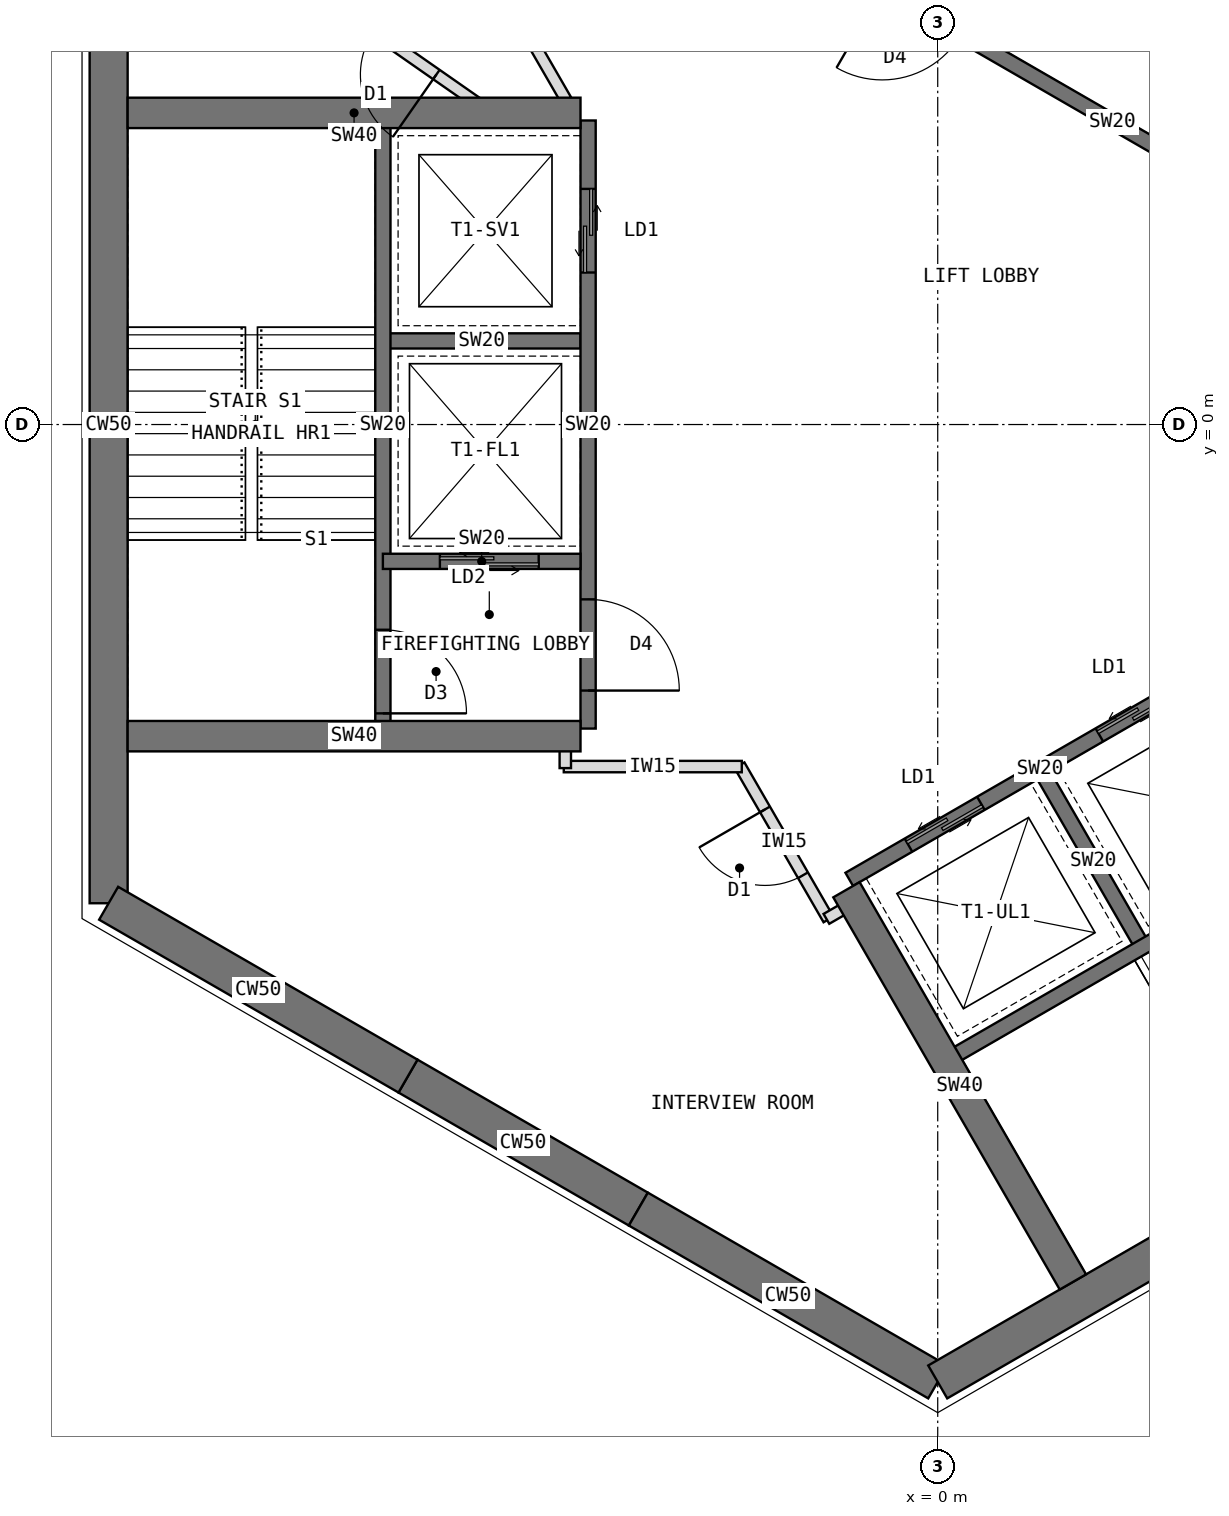
"""IFC4 building model, lengths in metres.
Left out: names, types, materials, properties, quantities, classifications, styles, units other than length and angle.
Written with IfcOpenShell. Run it as: python <this file> out.ifc"""

import sys

from ifc_helpers import new_model, si_unit, direction, frame, frame_2d, origin, place, context, subcontext, project, spatial, rectangle, extrude, element, fill, save


model = new_model("IFC4")
c1 = context("Model", 3, precision=1e-05, world=origin(), true_north=direction((0.0, 1.0)))
c2 = subcontext(c1, "Body", "Model", "MODEL_VIEW")
j1 = project(units=[si_unit("LENGTHUNIT", "METRE"), si_unit("PLANEANGLEUNIT", "RADIAN")], contexts=[c1])
p1 = place(None, origin())
s1 = spatial("IfcSite", under=j1, at=p1, CompositionType="ELEMENT")
p2 = place(p1, origin())
s2 = spatial("IfcBuilding", under=s1, at=p2, CompositionType="ELEMENT")
p3 = place(p2, frame((0.0, 0.0, 206.5)))
s3 = spatial("IfcBuildingStorey", under=s2, at=p3, CompositionType="ELEMENT", Elevation=206.5)
p4 = place(p3, frame((-10.908, 6.298, 0.0), z_axis=(0.0, 0.0, 1.0), x_axis=(0.0, -1.0, 0.0)))
e1 = element("IfcWall", 1, at=p4, inside=s3, PredefinedType="SHEAR", context=c2, shape_type="SweptSolid", body=[
    extrude(rectangle(XDim=12.596, YDim=0.5, at=frame_2d((6.298, 0.0))), origin(), (0.0, 0.0, 1.0), 4.0),
])
p5 = place(p3, frame((-10.908, -6.298, 0.0), z_axis=(0.0, 0.0, 1.0), x_axis=(0.866034513004, -0.499984222037, 0.0)))
e2 = element("IfcWall", 2, at=p5, inside=s3, PredefinedType="SHEAR", context=c2, shape_type="SweptSolid", body=[
    extrude(rectangle(XDim=4.548, YDim=0.5, at=frame_2d((2.274, 0.0))), origin(), (0.0, 0.0, 1.0), 4.0),
])
p6 = place(p3, frame((-6.97, -8.572, 0.0), z_axis=(0.0, 0.0, 1.0), x_axis=(0.866019471182, -0.500010275428, 0.0)))
e3 = element("IfcWall", 3, at=p6, inside=s3, PredefinedType="SHEAR", context=c2, shape_type="SweptSolid", body=[
    extrude(rectangle(XDim=3.5, YDim=0.5, at=frame_2d((1.75, 0.0))), origin(), (0.0, 0.0, 1.0), 4.0),
])
p7 = place(p3, frame((-3.939, -10.322, 0.0), z_axis=(0.0, 0.0, 1.0), x_axis=(0.866011268655, -0.500024481964, 0.0)))
e4 = element("IfcWall", 4, at=p7, inside=s3, PredefinedType="SHEAR", context=c2, shape_type="SweptSolid", body=[
    extrude(rectangle(XDim=4.548, YDim=0.5, at=frame_2d((2.274, 0.0))), origin(), (0.0, 0.0, 1.0), 4.0),
])
p8 = place(p3, frame((0.0, -12.596, 0.0), z_axis=(0.0, 0.0, 1.0), x_axis=(0.866021940709, 0.500005998175, 0.0)))
e5 = element("IfcWall", 5, at=p8, inside=s3, PredefinedType="SHEAR", context=c2, shape_type="SweptSolid", body=[
    extrude(rectangle(XDim=12.596, YDim=0.5, at=frame_2d((6.298, 0.0))), origin(), (0.0, 0.0, 1.0), 4.0),
])
p9 = place(p3, frame((5.764, 1.984, 0.0), z_axis=(0.0, 0.0, 1.0), x_axis=(-0.866026010844, 0.49999894854, 0.0)))
e6 = element("IfcWall", 6, at=p9, inside=s3, PredefinedType="SHEAR", context=c2, shape_type="SweptSolid", body=[
    extrude(rectangle(XDim=8.0, YDim=0.2, at=frame_2d((4.0, 0.0))), origin(), (0.0, 0.0, 1.0), 4.0),
])
p10 = place(p9, frame((6.3, 0.0, 0.0)))
e7 = element("IfcOpeningElement", 7, at=p10, cuts=e6, PredefinedType="OPENING", context=c2, shape_type="SweptSolid", body=[
    extrude(rectangle(XDim=1.2, YDim=2.1, at=frame_2d((0.6, 1.05))), frame((0.0, 0.11, 0.0), z_axis=(0.0, -1.0, 0.0), x_axis=(1.0, 0.0, 0.0)), (0.0, 0.0, 1.0), 0.22),
])
p11 = place(p3, frame((7.114, 4.322, 0.0), z_axis=(0.0, 0.0, 1.0), x_axis=(-0.866026010844, 0.49999894854, 0.0)))
e8 = element("IfcWall", 8, at=p11, inside=s3, PredefinedType="SHEAR", context=c2, shape_type="SweptSolid", body=[
    extrude(rectangle(XDim=8.0, YDim=0.2, at=frame_2d((4.0, 0.0))), origin(), (0.0, 0.0, 1.0), 4.0),
])
p12 = place(p11, frame((6.8, 0.0, 0.0)))
e9 = element("IfcOpeningElement", 9, at=p12, cuts=e8, PredefinedType="OPENING", context=c2, shape_type="SweptSolid", body=[
    extrude(rectangle(XDim=0.9, YDim=2.1, at=frame_2d((0.45, 1.05))), frame((0.0, 0.11, 0.0), z_axis=(0.0, -1.0, 0.0), x_axis=(1.0, 0.0, 0.0)), (0.0, 0.0, 1.0), 0.22),
])
p13 = place(p3, frame((-4.6, 4.0, 0.0), z_axis=(0.0, 0.0, 1.0), x_axis=(0.0, -1.0, 0.0)))
e10 = element("IfcWall", 10, at=p13, inside=s3, PredefinedType="SHEAR", context=c2, shape_type="SweptSolid", body=[
    extrude(rectangle(XDim=8.0, YDim=0.2, at=frame_2d((4.0, 0.0))), origin(), (0.0, 0.0, 1.0), 4.0),
])
p14 = place(p13, frame((6.3, 0.0, 0.0)))
e11 = element("IfcOpeningElement", 11, at=p14, cuts=e10, PredefinedType="OPENING", context=c2, shape_type="SweptSolid", body=[
    extrude(rectangle(XDim=1.2, YDim=2.1, at=frame_2d((0.6, 1.05))), frame((0.0, 0.11, 0.0), z_axis=(0.0, -1.0, 0.0), x_axis=(1.0, 0.0, 0.0)), (0.0, 0.0, 1.0), 0.22),
])
p15 = place(p13, frame((0.9, 0.0, 0.0)))
e12 = element("IfcOpeningElement", 12, at=p15, cuts=e10, PredefinedType="OPENING", context=c2, shape_type="SweptSolid", body=[
    extrude(rectangle(XDim=1.1, YDim=2.2, at=frame_2d((0.55, 1.1))), frame((0.0, 0.11, 0.0), z_axis=(0.0, -1.0, 0.0), x_axis=(1.0, 0.0, 0.0)), (0.0, 0.0, 1.0), 0.22),
])
p16 = place(p3, frame((-4.7, 1.1, 0.0), z_axis=(0.0, 0.0, 1.0), x_axis=(-1.0, 0.0, 0.0)))
e13 = element("IfcWall", 13, at=p16, inside=s3, PredefinedType="SHEAR", context=c2, shape_type="SweptSolid", body=[
    extrude(rectangle(XDim=2.6, YDim=0.2, at=frame_2d((1.3, 0.0))), origin(), (0.0, 0.0, 1.0), 4.0),
])
p17 = place(p3, frame((-4.7, -1.8, 0.0), z_axis=(0.0, 0.0, 1.0), x_axis=(-1.0, 0.0, 0.0)))
e14 = element("IfcWall", 14, at=p17, inside=s3, PredefinedType="SHEAR", context=c2, shape_type="SweptSolid", body=[
    extrude(rectangle(XDim=2.6, YDim=0.2, at=frame_2d((1.3, 0.0))), origin(), (0.0, 0.0, 1.0), 4.0),
])
p18 = place(p17, frame((0.55, 0.0, 0.0)))
e15 = element("IfcOpeningElement", 15, at=p18, cuts=e14, PredefinedType="OPENING", context=c2, shape_type="SweptSolid", body=[
    extrude(rectangle(XDim=1.3, YDim=2.2, at=frame_2d((0.65, 1.1))), frame((0.0, 0.11, 0.0), z_axis=(0.0, -1.0, 0.0), x_axis=(1.0, 0.0, 0.0)), (0.0, 0.0, 1.0), 0.22),
])
p19 = place(p3, frame((-7.3, 4.0, 0.0), z_axis=(0.0, 0.0, 1.0), x_axis=(0.0, -1.0, 0.0)))
e16 = element("IfcWall", 16, at=p19, inside=s3, PredefinedType="SHEAR", context=c2, shape_type="SweptSolid", body=[
    extrude(rectangle(XDim=8.0, YDim=0.2, at=frame_2d((4.0, 0.0))), origin(), (0.0, 0.0, 1.0), 4.0),
])
p20 = place(p19, frame((6.7, 0.0, 0.0)))
e17 = element("IfcOpeningElement", 17, at=p20, cuts=e16, PredefinedType="OPENING", context=c2, shape_type="SweptSolid", body=[
    extrude(rectangle(XDim=1.1, YDim=2.1, at=frame_2d((0.55, 1.05))), frame((0.0, 0.11, 0.0), z_axis=(0.0, -1.0, 0.0), x_axis=(1.0, 0.0, 0.0)), (0.0, 0.0, 1.0), 0.22),
])
for number, where, z_axis, x_axis in (
    (18, (-4.7, -4.1, 0.0), (0.0, 0.0, 1.0), (-1.0, 0.0, 0.0)),
    (19, (-4.7, 4.1, 0.0), (0.0, 0.0, 1.0), (-1.0, 0.0, 0.0)),
):
    element("IfcWall", number, at=place(p3, frame(where, z_axis=z_axis, x_axis=x_axis)), inside=s3, PredefinedType="SHEAR", context=c2, shape_type="SweptSolid", body=[
        extrude(rectangle(XDim=5.958, YDim=0.4, at=frame_2d((2.979, 0.0))), origin(), (0.0, 0.0, 1.0), 4.0),
    ])
p21 = place(p3, frame((-1.164, -5.984, 0.0), z_axis=(0.0, 0.0, 1.0), x_axis=(0.866026010844, 0.49999894854, 0.0)))
e20 = element("IfcWall", 20, at=p21, inside=s3, PredefinedType="SHEAR", context=c2, shape_type="SweptSolid", body=[
    extrude(rectangle(XDim=8.0, YDim=0.2, at=frame_2d((4.0, 0.0))), origin(), (0.0, 0.0, 1.0), 4.0),
])
p22 = place(p21, frame((6.3, 0.0, 0.0)))
e21 = element("IfcOpeningElement", 21, at=p22, cuts=e20, PredefinedType="OPENING", context=c2, shape_type="SweptSolid", body=[
    extrude(rectangle(XDim=1.2, YDim=2.1, at=frame_2d((0.6, 1.05))), frame((0.0, 0.11, 0.0), z_axis=(0.0, -1.0, 0.0), x_axis=(1.0, 0.0, 0.0)), (0.0, 0.0, 1.0), 0.22),
])
p23 = place(p21, frame((0.9, 0.0, 0.0)))
e22 = element("IfcOpeningElement", 22, at=p23, cuts=e20, PredefinedType="OPENING", context=c2, shape_type="SweptSolid", body=[
    extrude(rectangle(XDim=1.1, YDim=2.2, at=frame_2d((0.55, 1.1))), frame((0.0, 0.11, 0.0), z_axis=(0.0, -1.0, 0.0), x_axis=(1.0, 0.0, 0.0)), (0.0, 0.0, 1.0), 0.22),
])
p24 = place(p21, frame((3.8, 0.0, 0.0)))
e23 = element("IfcOpeningElement", 23, at=p24, cuts=e20, PredefinedType="OPENING", context=c2, shape_type="SweptSolid", body=[
    extrude(rectangle(XDim=1.1, YDim=2.2, at=frame_2d((0.55, 1.1))), frame((0.0, 0.11, 0.0), z_axis=(0.0, -1.0, 0.0), x_axis=(1.0, 0.0, 0.0)), (0.0, 0.0, 1.0), 0.22),
])
p25 = place(p3, frame((1.397, -4.62, 0.0), z_axis=(0.0, 0.0, 1.0), x_axis=(0.499936506574, -0.866062058628, 0.0)))
e24 = element("IfcWall", 24, at=p25, inside=s3, PredefinedType="SHEAR", context=c2, shape_type="SweptSolid", body=[
    extrude(rectangle(XDim=2.6, YDim=0.2, at=frame_2d((1.3, 0.0))), origin(), (0.0, 0.0, 1.0), 4.0),
])
p26 = place(p3, frame((0.186, -8.322, 0.0), z_axis=(0.0, 0.0, 1.0), x_axis=(0.866026010844, 0.49999894854, 0.0)))
e25 = element("IfcWall", 25, at=p26, inside=s3, PredefinedType="SHEAR", context=c2, shape_type="SweptSolid", body=[
    extrude(rectangle(XDim=8.0, YDim=0.2, at=frame_2d((4.0, 0.0))), origin(), (0.0, 0.0, 1.0), 4.0),
])
p27 = place(p26, frame((6.7, 0.0, 0.0)))
e26 = element("IfcOpeningElement", 26, at=p27, cuts=e25, PredefinedType="OPENING", context=c2, shape_type="SweptSolid", body=[
    extrude(rectangle(XDim=1.1, YDim=2.1, at=frame_2d((0.55, 1.05))), frame((0.0, 0.11, 0.0), z_axis=(0.0, -1.0, 0.0), x_axis=(1.0, 0.0, 0.0)), (0.0, 0.0, 1.0), 0.22),
])
p28 = place(p3, frame((-1.201, -6.12, 0.0), z_axis=(0.0, 0.0, 1.0), x_axis=(0.500021575205, -0.866012946976, 0.0)))
e27 = element("IfcWall", 27, at=p28, inside=s3, PredefinedType="SHEAR", context=c2, shape_type="SweptSolid", body=[
    extrude(rectangle(XDim=5.958, YDim=0.4, at=frame_2d((2.979, 0.0))), origin(), (0.0, 0.0, 1.0), 4.0),
])
p29 = place(p3, frame((-1.437, -6.511, 0.0), z_axis=(0.0, 0.0, 1.0), x_axis=(-0.500074377092, 0.865982457891, 0.0)))
e28 = element("IfcWall", 28, at=p29, inside=s3, PredefinedType="PARTITIONING", context=c2, shape_type="SweptSolid", body=[
    extrude(rectangle(XDim=2.342, YDim=0.15, at=frame_2d((1.171, 0.0))), origin(), (0.0, 0.0, 1.0), 3.8),
])
p30 = place(p29, frame((0.671, 0.0, 0.0)))
e29 = element("IfcOpeningElement", 29, at=p30, cuts=e28, PredefinedType="OPENING", context=c2, shape_type="SweptSolid", body=[
    extrude(rectangle(XDim=1.0, YDim=2.1, at=frame_2d((0.5, 1.05))), frame((0.0, 0.085, 0.0), z_axis=(0.0, -1.0, 0.0), x_axis=(1.0, 0.0, 0.0)), (0.0, 0.0, 1.0), 0.17),
])
p31 = place(p3, frame((-2.578, -4.5, 0.0), z_axis=(0.0, 0.0, 1.0), x_axis=(-1.0, 0.0, 0.0)))
e30 = element("IfcWall", 30, at=p31, inside=s3, PredefinedType="PARTITIONING", context=c2, shape_type="SweptSolid", body=[
    extrude(rectangle(XDim=2.342, YDim=0.15, at=frame_2d((1.171, 0.0))), origin(), (0.0, 0.0, 1.0), 3.8),
])
p32 = place(p3, frame((-4.9, -4.52, 0.0), z_axis=(0.0, 0.0, 1.0), x_axis=(0.0, 1.0, 0.0)))
e31 = element("IfcWall", 31, at=p32, inside=s3, PredefinedType="PARTITIONING", context=c2, shape_type="SweptSolid", body=[
    extrude(rectangle(XDim=0.43, YDim=0.15, at=frame_2d((0.215, 0.0))), origin(), (0.0, 0.0, 1.0), 3.8),
])
p33 = place(p3, frame((-4.89, 4.27, 0.0), z_axis=(0.0, 0.0, 1.0), x_axis=(-0.500032211057, 0.866006805923, 0.0)))
e32 = element("IfcWall", 32, at=p33, inside=s3, PredefinedType="PARTITIONING", context=c2, shape_type="SweptSolid", body=[
    extrude(rectangle(XDim=4.526, YDim=0.15, at=frame_2d((2.263, 0.0))), origin(), (0.0, 0.0, 1.0), 3.8),
])
p34 = place(p33, frame((2.668, 0.0, 0.0)))
e33 = element("IfcOpeningElement", 33, at=p34, cuts=e32, PredefinedType="OPENING", context=c2, shape_type="SweptSolid", body=[
    extrude(rectangle(XDim=1.0, YDim=2.1, at=frame_2d((0.5, 1.05))), frame((0.0, 0.085, 0.0), z_axis=(0.0, -1.0, 0.0), x_axis=(1.0, 0.0, 0.0)), (0.0, 0.0, 1.0), 0.17),
])
p35 = place(p3, frame((-1.092, -6.289, 0.0), z_axis=(0.0, 0.0, 1.0), x_axis=(-0.866138304741, -0.499804398801, 0.0)))
e34 = element("IfcWall", 34, at=p35, inside=s3, PredefinedType="PARTITIONING", context=c2, shape_type="SweptSolid", body=[
    extrude(rectangle(XDim=0.43, YDim=0.15, at=frame_2d((0.215, 0.0))), origin(), (0.0, 0.0, 1.0), 3.8),
])
p36 = place(p3, frame((-5.873, 4.1, 0.0), z_axis=(0.0, 0.0, 1.0), x_axis=(-0.819975923972, 0.572398011969, 0.0)))
e35 = element("IfcWall", 35, at=p36, inside=s3, PredefinedType="PARTITIONING", context=c2, shape_type="SweptSolid", body=[
    extrude(rectangle(XDim=4.605, YDim=0.15, at=frame_2d((2.303, 0.0))), origin(), (0.0, 0.0, 1.0), 3.8),
])
p37 = place(p36, frame((0.882, 0.0, 0.0)))
e36 = element("IfcOpeningElement", 36, at=p37, cuts=e35, PredefinedType="OPENING", context=c2, shape_type="SweptSolid", body=[
    extrude(rectangle(XDim=1.0, YDim=2.1, at=frame_2d((0.5, 1.05))), frame((0.0, 0.085, 0.0), z_axis=(0.0, -1.0, 0.0), x_axis=(1.0, 0.0, 0.0)), (0.0, 0.0, 1.0), 0.17),
])
p38 = place(p14, origin())
e37 = element("IfcDoor", 37, at=p38, inside=s3, OperationType="SINGLE_SWING_RIGHT", PredefinedType="DOOR", context=c2, shape_type="SweptSolid", body=[
    extrude(rectangle(XDim=1.2, YDim=2.1, at=frame_2d((0.6, 1.05))), frame((0.0, 0.025, 0.0), z_axis=(0.0, -1.0, 0.0), x_axis=(1.0, 0.0, 0.0)), (0.0, 0.0, 1.0), 0.05),
])
fill(e11, e37)
p39 = place(p18, origin())
e38 = element("IfcDoor", 38, at=p39, inside=s3, OperationType="DOUBLE_DOOR_SLIDING", PredefinedType="DOOR", context=c2, shape_type="SweptSolid", body=[
    extrude(rectangle(XDim=1.3, YDim=2.2, at=frame_2d((0.65, 1.1))), frame((0.0, 0.025, 0.0), z_axis=(0.0, -1.0, 0.0), x_axis=(1.0, 0.0, 0.0)), (0.0, 0.0, 1.0), 0.05),
])
fill(e15, e38)
p40 = place(p15, origin())
e39 = element("IfcDoor", 39, at=p40, inside=s3, OperationType="DOUBLE_DOOR_SLIDING", PredefinedType="DOOR", context=c2, shape_type="SweptSolid", body=[
    extrude(rectangle(XDim=1.1, YDim=2.2, at=frame_2d((0.55, 1.1))), frame((0.0, 0.025, 0.0), z_axis=(0.0, -1.0, 0.0), x_axis=(1.0, 0.0, 0.0)), (0.0, 0.0, 1.0), 0.05),
])
fill(e12, e39)
p41 = place(p20, origin())
e40 = element("IfcDoor", 40, at=p41, inside=s3, OperationType="SINGLE_SWING_RIGHT", PredefinedType="DOOR", context=c2, shape_type="SweptSolid", body=[
    extrude(rectangle(XDim=1.1, YDim=2.1, at=frame_2d((0.55, 1.05))), frame((0.0, 0.025, 0.0), z_axis=(0.0, -1.0, 0.0), x_axis=(1.0, 0.0, 0.0)), (0.0, 0.0, 1.0), 0.05),
])
fill(e17, e40)
p42 = place(p23, origin())
e41 = element("IfcDoor", 41, at=p42, inside=s3, OperationType="DOUBLE_DOOR_SLIDING", PredefinedType="DOOR", context=c2, shape_type="SweptSolid", body=[
    extrude(rectangle(XDim=1.1, YDim=2.2, at=frame_2d((0.55, 1.1))), frame((0.0, 0.025, 0.0), z_axis=(0.0, -1.0, 0.0), x_axis=(1.0, 0.0, 0.0)), (0.0, 0.0, 1.0), 0.05),
])
fill(e22, e41)
p43 = place(p24, origin())
e42 = element("IfcDoor", 42, at=p43, inside=s3, OperationType="DOUBLE_DOOR_SLIDING", PredefinedType="DOOR", context=c2, shape_type="SweptSolid", body=[
    extrude(rectangle(XDim=1.1, YDim=2.2, at=frame_2d((0.55, 1.1))), frame((0.0, 0.025, 0.0), z_axis=(0.0, -1.0, 0.0), x_axis=(1.0, 0.0, 0.0)), (0.0, 0.0, 1.0), 0.05),
])
fill(e23, e42)
p44 = place(p30, origin())
e43 = element("IfcDoor", 43, at=p44, inside=s3, OperationType="SINGLE_SWING_RIGHT", PredefinedType="DOOR", context=c2, shape_type="SweptSolid", body=[
    extrude(rectangle(XDim=1.0, YDim=2.1, at=frame_2d((0.5, 1.05))), frame((0.0, 0.025, 0.0), z_axis=(0.0, -1.0, 0.0), x_axis=(1.0, 0.0, 0.0)), (0.0, 0.0, 1.0), 0.05),
])
fill(e29, e43)
p45 = place(p37, origin())
e44 = element("IfcDoor", 44, at=p45, inside=s3, OperationType="SINGLE_SWING_LEFT", PredefinedType="DOOR", context=c2, shape_type="SweptSolid", body=[
    extrude(rectangle(XDim=1.0, YDim=2.1, at=frame_2d((0.5, 1.05))), frame((0.0, 0.025, 0.0), z_axis=(0.0, -1.0, 0.0), x_axis=(1.0, 0.0, 0.0)), (0.0, 0.0, 1.0), 0.05),
])
fill(e36, e44)
save(model, sys.argv[1])
